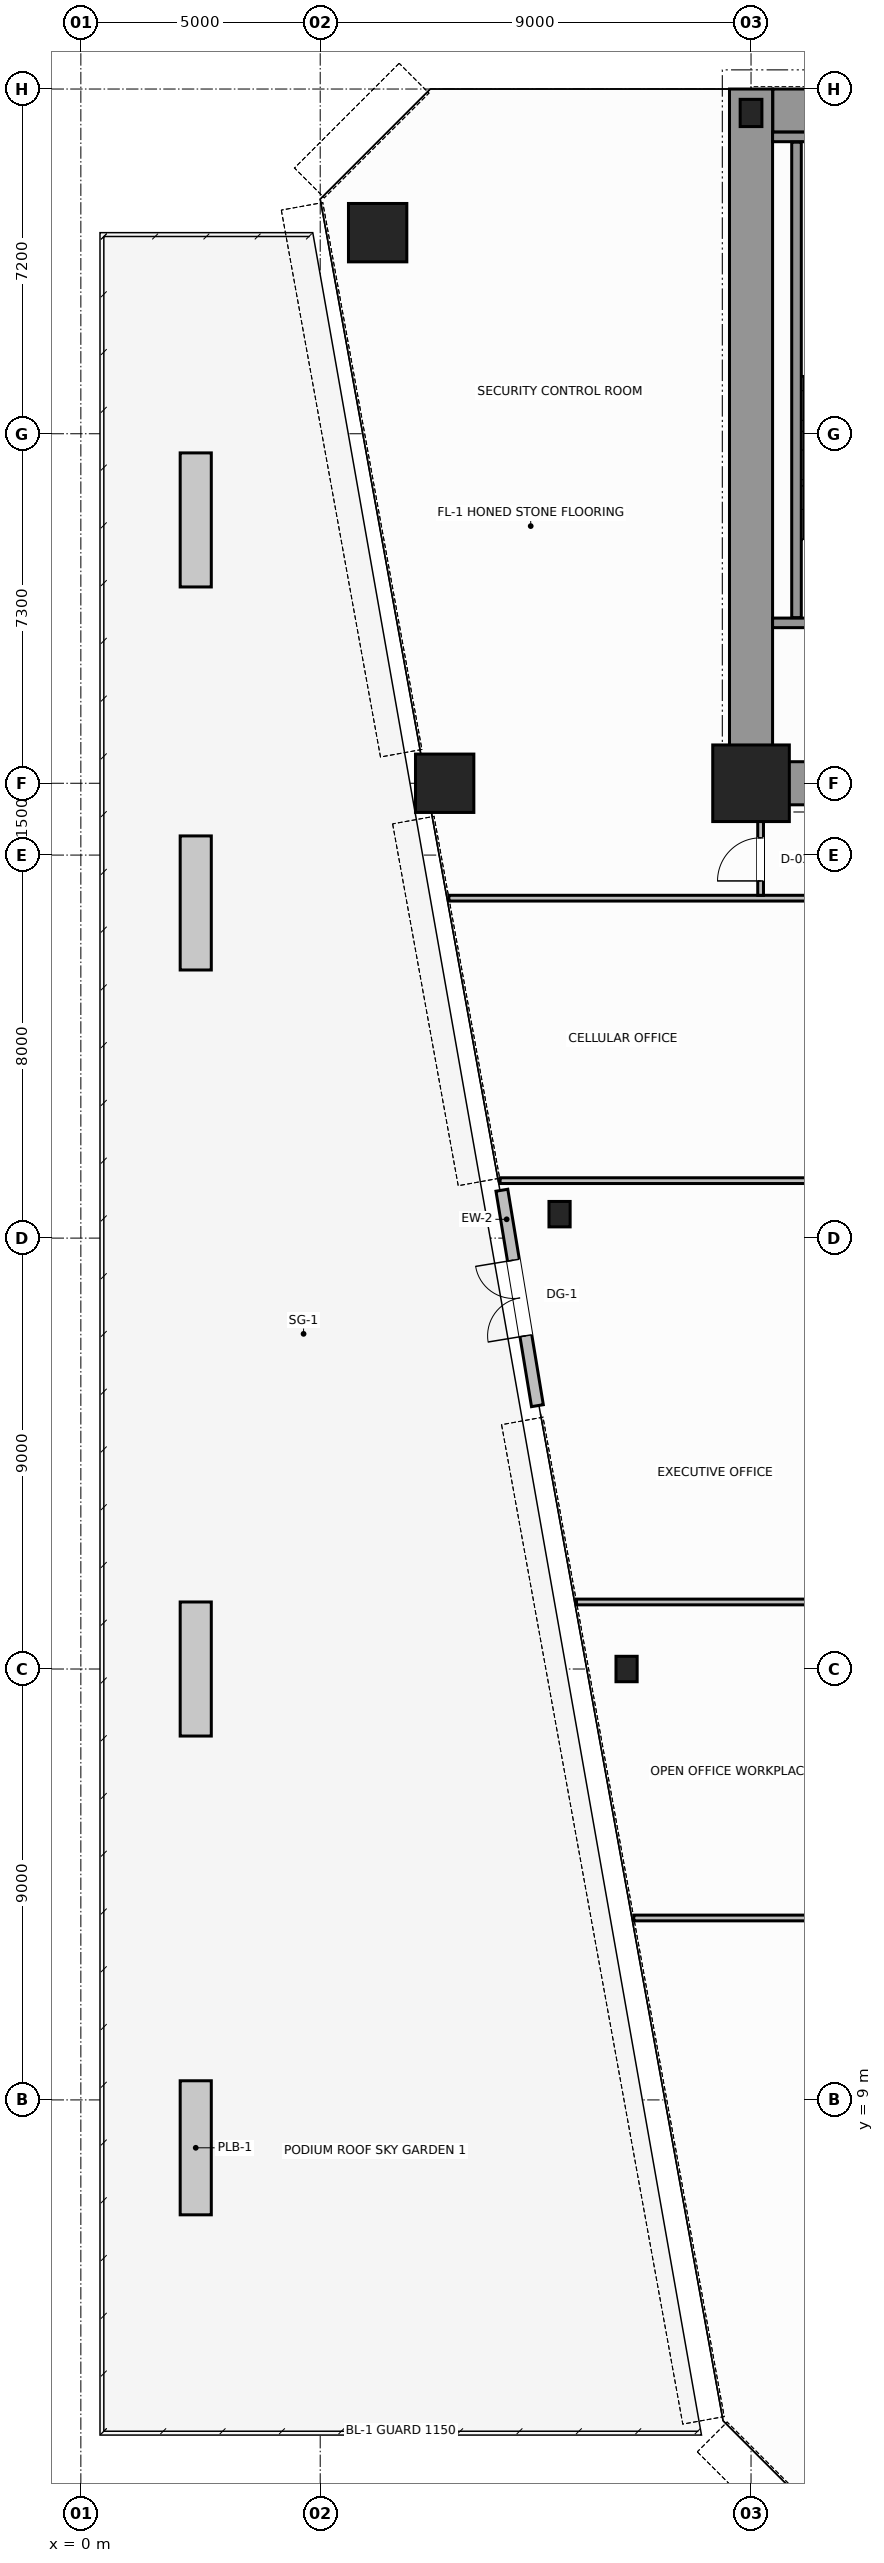
"""IFC4 building model, lengths in metres.
Left out: names, types, materials, properties, quantities, classifications, styles, units other than length and angle.
Written with IfcOpenShell. Run it as: python <this file> out.ifc"""

import sys

from ifc_helpers import new_model, si_unit, direction, frame, frame_2d, origin, origin_2d, place, context, subcontext, project, spatial, rectangle, hollow_circle, i_section, extrude, source, transform, mapped, element, fill, save


model = new_model("IFC4")
c1 = context("Model", 3, precision=1e-05, world=origin(), true_north=direction((0.0, 1.0)))
c2 = subcontext(c1, "Body", "Model", "MODEL_VIEW")
j1 = project(units=[si_unit("LENGTHUNIT", "METRE"), si_unit("PLANEANGLEUNIT", "RADIAN")], contexts=[c1])
p1 = place(None, origin())
s1 = spatial("IfcSite", under=j1, at=p1, CompositionType="ELEMENT")
p2 = place(p1, origin())
s2 = spatial("IfcBuilding", under=s1, at=p2, CompositionType="ELEMENT")
p3 = place(p2, frame((0.0, 0.0, 18.8)))
s3 = spatial("IfcBuildingStorey", under=s2, at=p3, CompositionType="ELEMENT", Elevation=18.8)
m1 = source(origin(), c2, "Body", "SweptSolid", [
    extrude(rectangle(XDim=1.6, YDim=1.6, at=origin_2d()), origin(), (0.0, 0.0, 1.0), 3.8),
])
p4 = place(p3, frame((14.0, 36.5, 0.0), z_axis=(0.0, 0.0, 1.0), x_axis=(1.0, 0.0, 0.0)))
e1 = element("IfcColumn", 1, at=p4, inside=s3, PredefinedType="COLUMN", context=c2, shape_type="MappedRepresentation", body=[
    mapped(m1, transform((0.0, 0.0, 0.0), scale=1.0)),
])
m2 = source(origin(), c2, "Body", "SweptSolid", [
    extrude(i_section(OverallWidth=0.454, OverallDepth=0.569, WebThickness=0.078, FlangeThickness=0.08, FilletRadius=0.015, at=origin_2d()), origin(), (0.0, 0.0, 1.0), 3.8),
])
p5 = place(p3, frame((14.0, 50.5, 0.0), z_axis=(0.0, 0.0, 1.0), x_axis=(1.0, 0.0, 0.0)))
e2 = element("IfcColumn", 2, at=p5, inside=s3, PredefinedType="COLUMN", context=c2, shape_type="MappedRepresentation", body=[
    mapped(m2, transform((0.0, 0.0, 0.0), scale=1.0)),
])
m3 = source(origin(), c2, "Body", "SweptSolid", [
    extrude(hollow_circle(Radius=0.61, WallThickness=0.05, at=origin_2d()), origin(), (0.0, 0.0, 1.0), 3.8),
])
for number, where, z_axis, x_axis in (
    (3, (6.2, 48.0, 0.0), (0.0, 0.0, 1.0), (1.0, 0.0, 0.0)),
    (4, (7.6, 36.5, 0.0), (0.0, 0.0, 1.0), (1.0, 0.0, 0.0)),
):
    element("IfcColumn", number, at=place(p3, frame(where, z_axis=z_axis, x_axis=x_axis)), inside=s3, PredefinedType="COLUMN", context=c2, shape_type="MappedRepresentation", body=[
        mapped(m3, transform((0.0, 0.0, 0.0), scale=1.0)),
    ])
m4 = source(origin(), c2, "Body", "SweptSolid", [
    extrude(i_section(OverallWidth=0.442, OverallDepth=0.531, WebThickness=0.065, FlangeThickness=0.076, FilletRadius=0.015, at=origin_2d()), origin(), (0.0, 0.0, 1.0), 3.8),
])
for number, where, z_axis, x_axis in (
    (5, (10.0, 27.5, 0.0), (0.0, 0.0, 1.0), (1.0, 0.0, 0.0)),
    (6, (11.4, 18.0, 0.0), (0.0, 0.0, 1.0), (1.0, 0.0, 0.0)),
):
    element("IfcColumn", number, at=place(p3, frame(where, z_axis=z_axis, x_axis=x_axis)), inside=s3, PredefinedType="COLUMN", context=c2, shape_type="MappedRepresentation", body=[
        mapped(m4, transform((0.0, 0.0, 0.0), scale=1.0)),
    ])
p6 = place(p3, frame((14.454, 50.55, 0.0), z_axis=(0.0, 0.0, 1.0), x_axis=(1.0, 0.0, 0.0)))
e7 = element("IfcWall", 7, at=p6, inside=s3, PredefinedType="SHEAR", context=c2, shape_type="SweptSolid", body=[
    extrude(rectangle(XDim=19.544, YDim=0.9, at=frame_2d((9.772, 0.0))), origin(), (0.0, 0.0, 1.0), 3.8),
])
p7 = place(p3, frame((14.0, 36.5, 0.0), z_axis=(0.0, 0.0, 1.0), x_axis=(0.0, 1.0, 0.0)))
e8 = element("IfcWall", 8, at=p7, inside=s3, PredefinedType="SHEAR", context=c2, shape_type="SweptSolid", body=[
    extrude(rectangle(XDim=14.5, YDim=0.9, at=frame_2d((7.25, 0.0))), origin(), (0.0, 0.0, 1.0), 3.8),
])
p8 = place(p3, frame((14.47, 36.5, 0.0), z_axis=(0.0, 0.0, 1.0), x_axis=(1.0, 0.0, 0.0)))
e9 = element("IfcWall", 9, at=p8, inside=s3, PredefinedType="SHEAR", context=c2, shape_type="SweptSolid", body=[
    extrude(rectangle(XDim=3.73, YDim=0.9, at=frame_2d((1.865, 0.0))), origin(), (0.0, 0.0, 1.0), 2.38),
])
p9 = place(p3, frame((9.538, 23.5, 0.0), z_axis=(0.0, 0.0, 1.0), x_axis=(-0.162836302539, 0.98665309941, 0.0)))
e10 = element("IfcWall", 10, at=p9, inside=s3, PredefinedType="STANDARD", context=c2, shape_type="SweptSolid", body=[
    extrude(rectangle(XDim=4.561, YDim=0.25, at=frame_2d((2.28, 0.0))), origin(), (0.0, 0.0, 1.0), 3.58),
])
p10 = place(p9, frame((1.48, 0.0, 0.0)))
e11 = element("IfcOpeningElement", 11, at=p10, cuts=e10, PredefinedType="OPENING", context=c2, shape_type="SweptSolid", body=[
    extrude(rectangle(XDim=1.6, YDim=2.3, at=frame_2d((0.8, 1.15))), frame((0.0, 0.135, 0.0), z_axis=(0.0, -1.0, 0.0), x_axis=(1.0, 0.0, 0.0)), (0.0, 0.0, 1.0), 0.27),
])
for number, where, z_axis, x_axis in (
    (12, (2.4, 6.6, 0.0), (0.0, 0.0, 1.0), (0.0, 1.0, 0.0)),
    (13, (2.4, 16.6, 0.0), (0.0, 0.0, 1.0), (0.0, 1.0, 0.0)),
    (14, (2.4, 32.6, 0.0), (0.0, 0.0, 1.0), (0.0, 1.0, 0.0)),
    (15, (2.4, 40.6, 0.0), (0.0, 0.0, 1.0), (0.0, 1.0, 0.0)),
):
    element("IfcWall", number, at=place(p3, frame(where, z_axis=z_axis, x_axis=x_axis)), inside=s3, PredefinedType="PARAPET", context=c2, shape_type="SweptSolid", body=[
        extrude(rectangle(XDim=2.8, YDim=0.65, at=frame_2d((1.4, 0.0))), origin(), (0.0, 0.0, 1.0), 0.65),
    ])
p11 = place(p3, frame((14.45, 39.85, 0.0), z_axis=(0.0, 0.0, 1.0), x_axis=(1.0, 0.0, 0.0)))
e16 = element("IfcWall", 16, at=p11, inside=s3, PredefinedType="SOLIDWALL", context=c2, shape_type="SweptSolid", body=[
    extrude(rectangle(XDim=4.15, YDim=0.2, at=frame_2d((2.075, 0.0))), origin(), (0.0, 0.0, 1.0), 3.8),
])
p12 = place(p11, frame((1.725, 0.0, 0.0)))
e17 = element("IfcOpeningElement", 17, at=p12, cuts=e16, PredefinedType="OPENING", context=c2, shape_type="SweptSolid", body=[
    extrude(rectangle(XDim=1.1, YDim=2.15, at=frame_2d((0.55, 1.075))), frame((0.0, 0.11, 0.0), z_axis=(0.0, -1.0, 0.0), x_axis=(1.0, 0.0, 0.0)), (0.0, 0.0, 1.0), 0.22),
])
p13 = place(p3, frame((14.45, 50.0, 0.0), z_axis=(0.0, 0.0, 1.0), x_axis=(1.0, 0.0, 0.0)))
e18 = element("IfcWall", 18, at=p13, inside=s3, PredefinedType="SOLIDWALL", context=c2, shape_type="SweptSolid", body=[
    extrude(rectangle(XDim=4.15, YDim=0.2, at=frame_2d((2.075, 0.0))), origin(), (0.0, 0.0, 1.0), 3.8),
])
p14 = place(p3, frame((14.95, 39.96, 0.0), z_axis=(0.0, 0.0, 1.0), x_axis=(0.0, 1.0, 0.0)))
e19 = element("IfcWall", 19, at=p14, inside=s3, PredefinedType="SOLIDWALL", context=c2, shape_type="SweptSolid", body=[
    extrude(rectangle(XDim=9.93, YDim=0.2, at=frame_2d((4.965, 0.0))), origin(), (0.0, 0.0, 1.0), 3.8),
])
p15 = place(p3, frame((7.688, 34.1, 0.0), z_axis=(0.0, 0.0, 1.0), x_axis=(1.0, 0.0, 0.0)))
e20 = element("IfcWall", 20, at=p15, inside=s3, PredefinedType="PARTITIONING", context=c2, shape_type="SweptSolid", body=[
    extrude(rectangle(XDim=9.452, YDim=0.12, at=frame_2d((4.726, 0.0))), origin(), (0.0, 0.0, 1.0), 3.58),
])
p16 = place(p3, frame((14.2, 34.16, 0.0), z_axis=(0.0, 0.0, 1.0), x_axis=(0.0, 1.0, 0.0)))
e21 = element("IfcWall", 21, at=p16, inside=s3, PredefinedType="PARTITIONING", context=c2, shape_type="SweptSolid", body=[
    extrude(rectangle(XDim=2.28, YDim=0.12, at=frame_2d((1.14, 0.0))), origin(), (0.0, 0.0, 1.0), 3.58),
])
p17 = place(p16, frame((0.3, 0.0, 0.0)))
e22 = element("IfcOpeningElement", 22, at=p17, cuts=e21, PredefinedType="OPENING", context=c2, shape_type="SweptSolid", body=[
    extrude(rectangle(XDim=0.9, YDim=2.15, at=frame_2d((0.45, 1.075))), frame((0.0, 0.07, 0.0), z_axis=(0.0, -1.0, 0.0), x_axis=(1.0, 0.0, 0.0)), (0.0, 0.0, 1.0), 0.14),
])
p18 = place(p3, frame((11.551, 12.8, 0.0), z_axis=(0.0, 0.0, 1.0), x_axis=(1.0, 0.0, 0.0)))
e23 = element("IfcWall", 23, at=p18, inside=s3, PredefinedType="PARTITIONING", context=c2, shape_type="SweptSolid", body=[
    extrude(rectangle(XDim=5.589, YDim=0.12, at=frame_2d((2.794, 0.0))), origin(), (0.0, 0.0, 1.0), 3.58),
])
p19 = place(p3, frame((10.354, 19.4, 0.0), z_axis=(0.0, 0.0, 1.0), x_axis=(1.0, 0.0, 0.0)))
e24 = element("IfcWall", 24, at=p19, inside=s3, PredefinedType="PARTITIONING", context=c2, shape_type="SweptSolid", body=[
    extrude(rectangle(XDim=6.786, YDim=0.12, at=frame_2d((3.393, 0.0))), origin(), (0.0, 0.0, 1.0), 3.58),
])
p20 = place(p3, frame((8.758, 28.2, 0.0), z_axis=(0.0, 0.0, 1.0), x_axis=(1.0, 0.0, 0.0)))
e25 = element("IfcWall", 25, at=p20, inside=s3, PredefinedType="PARTITIONING", context=c2, shape_type="SweptSolid", body=[
    extrude(rectangle(XDim=8.382, YDim=0.12, at=frame_2d((4.191, 0.0))), origin(), (0.0, 0.0, 1.0), 3.58),
])
m5 = source(origin(), c2, "Body", "SweptSolid", [
    extrude(rectangle(XDim=1.6, YDim=2.3, at=frame_2d((0.8, 1.15))), frame((0.0, 0.025, 0.0), z_axis=(0.0, -1.0, 0.0), x_axis=(1.0, 0.0, 0.0)), (0.0, 0.0, 1.0), 0.05),
])
p21 = place(p10, origin())
e26 = element("IfcDoor", 26, at=p21, inside=s3, OperationType="DOUBLE_DOOR_SINGLE_SWING", PredefinedType="DOOR", context=c2, shape_type="MappedRepresentation", body=[
    mapped(m5, transform((0.0, 0.0, 0.0), scale=1.0)),
])
fill(e11, e26)
m6 = source(origin(), c2, "Body", "SweptSolid", [
    extrude(rectangle(XDim=0.9, YDim=2.15, at=frame_2d((0.45, 1.075))), frame((0.0, 0.025, 0.0), z_axis=(0.0, -1.0, 0.0), x_axis=(1.0, 0.0, 0.0)), (0.0, 0.0, 1.0), 0.05),
])
p22 = place(p17, origin())
e27 = element("IfcDoor", 27, at=p22, inside=s3, OperationType="SINGLE_SWING_LEFT", PredefinedType="DOOR", context=c2, shape_type="MappedRepresentation", body=[
    mapped(m6, transform((0.0, 0.0, 0.0), scale=1.0)),
])
fill(e22, e27)
save(model, sys.argv[1])
